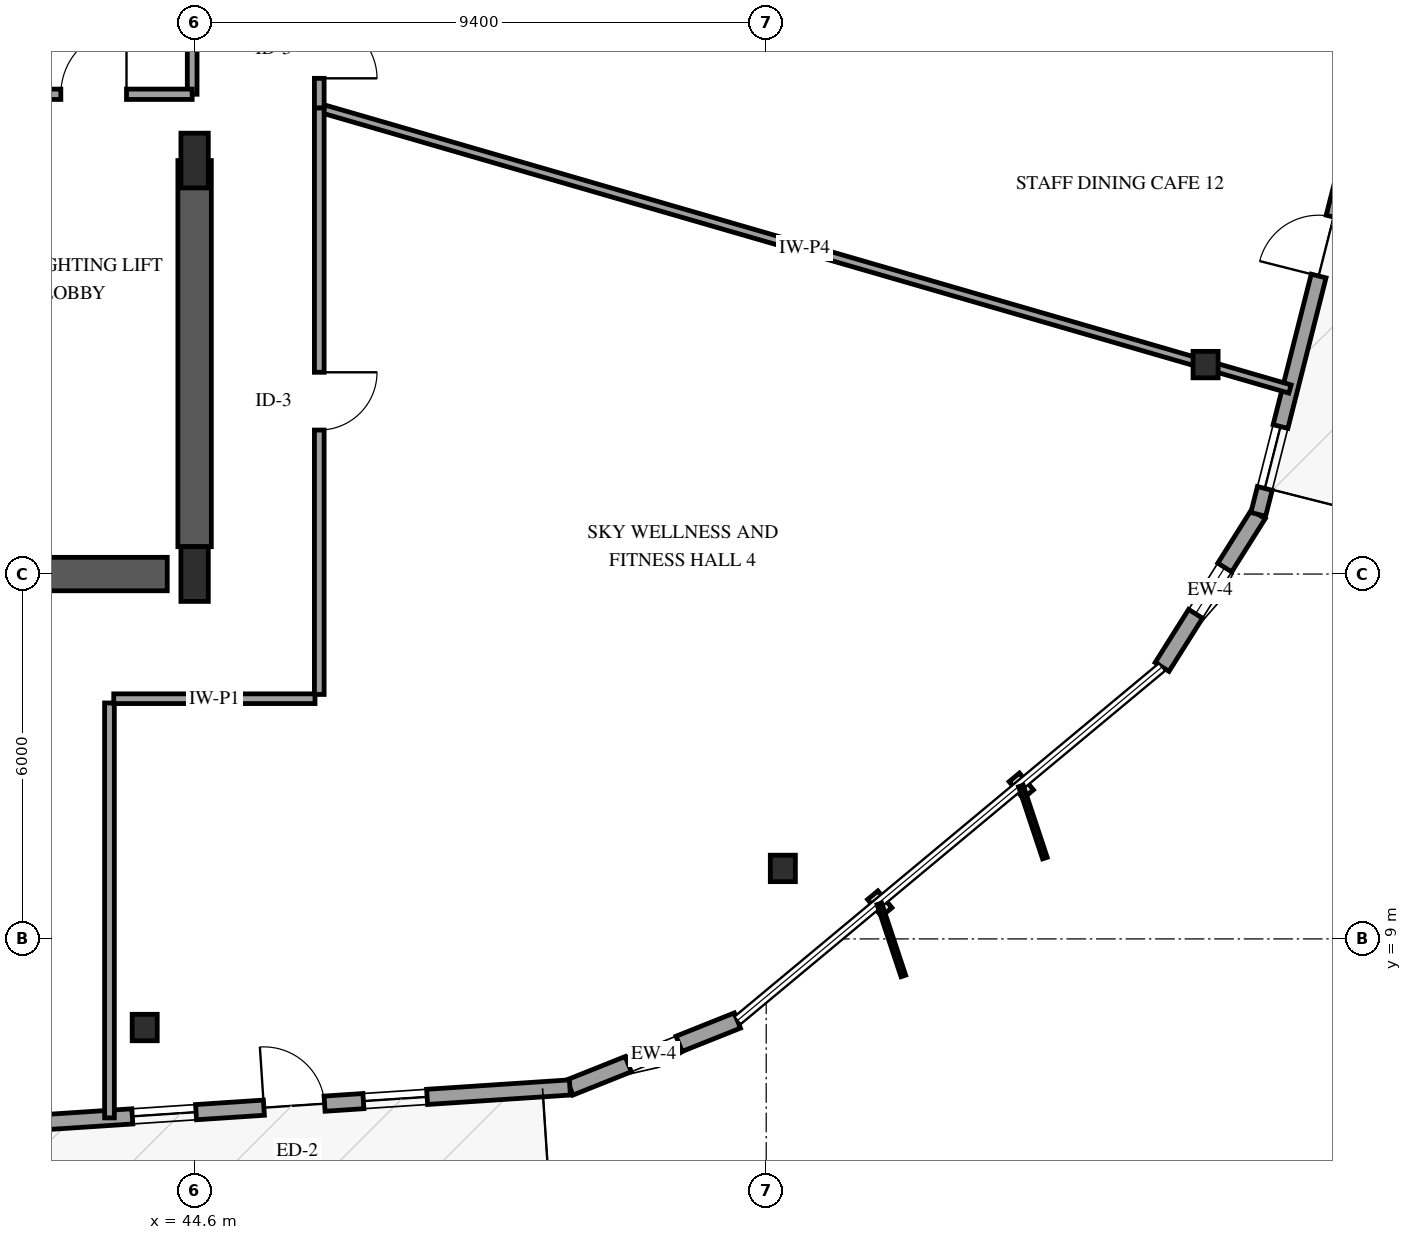
"""IFC4 building model, lengths in metres.
Left out: names, types, materials, properties, quantities, classifications, styles, units other than length and angle.
Written with IfcOpenShell. Run it as: python <this file> out.ifc"""

import sys

from ifc_helpers import new_model, si_unit, direction, frame, frame_2d, origin, origin_2d, place, context, subcontext, project, spatial, rectangle, i_section, extrude, element, fill, save


model = new_model("IFC4")
c1 = context("Model", 3, precision=1e-05, world=origin(), true_north=direction((0.0, 1.0)))
c2 = subcontext(c1, "Body", "Model", "MODEL_VIEW")
j1 = project(units=[si_unit("LENGTHUNIT", "METRE"), si_unit("PLANEANGLEUNIT", "RADIAN")], contexts=[c1])
p1 = place(None, origin())
s1 = spatial("IfcSite", under=j1, at=p1, CompositionType="ELEMENT")
p2 = place(p1, origin())
s2 = spatial("IfcBuilding", under=s1, at=p2, CompositionType="ELEMENT")
p3 = place(p2, frame((0.0, 0.0, 178.6)))
s3 = spatial("IfcBuildingStorey", under=s2, at=p3, CompositionType="ELEMENT", Elevation=178.6)
p4 = place(p3, frame((41.3, 15.0, 0.0), z_axis=(0.0, 0.0, 1.0), x_axis=(1.0, 0.0, 0.0)))
e1 = element("IfcWall", 1, at=p4, inside=s3, PredefinedType="SHEAR", context=c2, shape_type="SweptSolid", body=[
    extrude(rectangle(XDim=2.85, YDim=0.55, at=frame_2d((1.425, 0.0))), origin(), (0.0, 0.0, 1.0), 3.6),
])
p5 = place(p3, frame((44.6, 15.45, 0.0), z_axis=(0.0, 0.0, 1.0), x_axis=(0.0, 1.0, 0.0)))
e2 = element("IfcWall", 2, at=p5, inside=s3, PredefinedType="SHEAR", context=c2, shape_type="SweptSolid", body=[
    extrude(rectangle(XDim=6.35, YDim=0.55, at=frame_2d((3.175, 0.0))), origin(), (0.0, 0.0, 1.0), 3.6),
])
for number, where, z_axis, x_axis in (
    (3, (44.6, 15.0, 0.0), (0.0, 0.0, 1.0), (1.0, 0.0, 0.0)),
    (4, (44.6, 21.8, 0.0), (0.0, 0.0, 1.0), (1.0, 0.0, 0.0)),
):
    element("IfcColumn", number, at=place(p3, frame(where, z_axis=z_axis, x_axis=x_axis)), inside=s3, PredefinedType="PILASTER", context=c2, shape_type="SweptSolid", body=[
        extrude(rectangle(XDim=0.45, YDim=0.9, at=origin_2d()), origin(), (0.0, 0.0, 1.0), 3.6),
    ])
for number, where, z_axis, x_axis in (
    (5, (43.779, 7.542, 0.0), (0.0, 0.0, 1.0), (1.0, 0.0, 0.0)),
    (6, (54.274, 10.159, 0.0), (0.0, 0.0, 1.0), (1.0, 0.0, 0.0)),
    (7, (61.226, 18.444, 0.0), (0.0, 0.0, 1.0), (1.0, 0.0, 0.0)),
):
    element("IfcColumn", number, at=place(p3, frame(where, z_axis=z_axis, x_axis=x_axis)), inside=s3, PredefinedType="COLUMN", context=c2, shape_type="SweptSolid", body=[
        extrude(i_section(OverallWidth=0.412, OverallDepth=0.435, WebThickness=0.036, FlangeThickness=0.057, FilletRadius=0.038, at=origin_2d()), origin(), (0.0, 0.0, 1.0), 3.6),
    ])
p6 = place(p3, frame((50.772, 6.557, 0.0), z_axis=(0.0, 0.0, 1.0), x_axis=(0.928595836805, 0.371092672884, 0.0)))
e8 = element("IfcWall", 8, at=p6, inside=s3, PredefinedType="SOLIDWALL", context=c2, shape_type="SweptSolid", body=[
    extrude(rectangle(XDim=2.967, YDim=0.27, at=frame_2d((1.483, 0.0))), origin(), (0.0, 0.0, 1.0), 2.679),
])
p7 = place(p6, frame((1.033, 0.0, 0.75)))
e9 = element("IfcOpeningElement", 9, at=p7, cuts=e8, PredefinedType="OPENING", context=c2, shape_type="SweptSolid", body=[
    extrude(rectangle(XDim=0.9, YDim=1.5, at=frame_2d((0.45, 0.75))), frame((0.0, 0.145, 0.0), z_axis=(0.0, -1.0, 0.0), x_axis=(1.0, 0.0, 0.0)), (0.0, 0.0, 1.0), 0.29),
])
p8 = place(p3, frame((41.705, 5.958, 0.0), z_axis=(0.0, 0.0, 1.0), x_axis=(0.997825981394, 0.06590380001, 0.0)))
e10 = element("IfcWall", 10, at=p8, inside=s3, PredefinedType="SOLIDWALL", context=c2, shape_type="SweptSolid", body=[
    extrude(rectangle(XDim=9.087, YDim=0.25, at=frame_2d((4.543, 0.0))), origin(), (0.0, 0.0, 1.0), 2.679),
])
p9 = place(p8, frame((4.043, 0.0, 0.0)))
e11 = element("IfcOpeningElement", 11, at=p9, cuts=e10, PredefinedType="OPENING", context=c2, shape_type="SweptSolid", body=[
    extrude(rectangle(XDim=1.0, YDim=2.15, at=frame_2d((0.5, 1.075))), frame((0.0, 0.135, 0.0), z_axis=(0.0, -1.0, 0.0), x_axis=(1.0, 0.0, 0.0)), (0.0, 0.0, 1.0), 0.27),
])
p10 = place(p8, frame((1.875, 0.0, 0.72)))
e12 = element("IfcOpeningElement", 12, at=p10, cuts=e10, PredefinedType="OPENING", context=c2, shape_type="SweptSolid", body=[
    extrude(rectangle(XDim=1.05, YDim=1.55, at=frame_2d((0.525, 0.775))), frame((0.0, 0.135, 0.0), z_axis=(0.0, -1.0, 0.0), x_axis=(1.0, 0.0, 0.0)), (0.0, 0.0, 1.0), 0.27),
])
p11 = place(p8, frame((5.684, 0.0, 0.72)))
e13 = element("IfcOpeningElement", 13, at=p11, cuts=e10, PredefinedType="OPENING", context=c2, shape_type="SweptSolid", body=[
    extrude(rectangle(XDim=1.05, YDim=1.55, at=frame_2d((0.525, 0.775))), frame((0.0, 0.135, 0.0), z_axis=(0.0, -1.0, 0.0), x_axis=(1.0, 0.0, 0.0)), (0.0, 0.0, 1.0), 0.27),
])
p12 = place(p3, frame((60.51, 13.472, 0.0), z_axis=(0.0, 0.0, 1.0), x_axis=(0.533190820805, 0.845995005074, 0.0)))
e14 = element("IfcWall", 14, at=p12, inside=s3, PredefinedType="SOLIDWALL", context=c2, shape_type="SweptSolid", body=[
    extrude(rectangle(XDim=2.967, YDim=0.27, at=frame_2d((1.483, 0.0))), origin(), (0.0, 0.0, 1.0), 2.679),
])
p13 = place(p12, frame((1.033, 0.0, 0.75)))
e15 = element("IfcOpeningElement", 15, at=p13, cuts=e14, PredefinedType="OPENING", context=c2, shape_type="SweptSolid", body=[
    extrude(rectangle(XDim=0.9, YDim=1.5, at=frame_2d((0.45, 0.75))), frame((0.0, 0.145, 0.0), z_axis=(0.0, -1.0, 0.0), x_axis=(1.0, 0.0, 0.0)), (0.0, 0.0, 1.0), 0.29),
])
p14 = place(p3, frame((62.092, 15.982, 0.0), z_axis=(0.0, 0.0, 1.0), x_axis=(0.245644624453, 0.969359952999, 0.0)))
e16 = element("IfcWall", 16, at=p14, inside=s3, PredefinedType="SOLIDWALL", context=c2, shape_type="SweptSolid", body=[
    extrude(rectangle(XDim=9.087, YDim=0.25, at=frame_2d((4.543, 0.0))), origin(), (0.0, 0.0, 1.0), 2.679),
])
p15 = place(p14, frame((4.043, 0.0, 0.0)))
e17 = element("IfcOpeningElement", 17, at=p15, cuts=e16, PredefinedType="OPENING", context=c2, shape_type="SweptSolid", body=[
    extrude(rectangle(XDim=1.0, YDim=2.15, at=frame_2d((0.5, 1.075))), frame((0.0, 0.135, 0.0), z_axis=(0.0, -1.0, 0.0), x_axis=(1.0, 0.0, 0.0)), (0.0, 0.0, 1.0), 0.27),
])
p16 = place(p14, frame((0.44, 0.0, 0.72)))
e18 = element("IfcOpeningElement", 18, at=p16, cuts=e16, PredefinedType="OPENING", context=c2, shape_type="SweptSolid", body=[
    extrude(rectangle(XDim=1.05, YDim=1.55, at=frame_2d((0.525, 0.775))), frame((0.0, 0.135, 0.0), z_axis=(0.0, -1.0, 0.0), x_axis=(1.0, 0.0, 0.0)), (0.0, 0.0, 1.0), 0.27),
])
p17 = place(p14, frame((5.684, 0.0, 0.72)))
e19 = element("IfcOpeningElement", 19, at=p17, cuts=e16, PredefinedType="OPENING", context=c2, shape_type="SweptSolid", body=[
    extrude(rectangle(XDim=1.05, YDim=1.55, at=frame_2d((0.525, 0.775))), frame((0.0, 0.135, 0.0), z_axis=(0.0, -1.0, 0.0), x_axis=(1.0, 0.0, 0.0)), (0.0, 0.0, 1.0), 0.27),
])
p18 = place(p3, frame((46.65, 22.667, 0.0), z_axis=(0.0, 0.0, 1.0), x_axis=(0.960518719395, -0.278215365663, 0.0)))
e20 = element("IfcWall", 20, at=p18, inside=s3, PredefinedType="PARTITIONING", context=c2, shape_type="SweptSolid", body=[
    extrude(rectangle(XDim=16.62, YDim=0.14, at=frame_2d((8.31, 0.0))), origin(), (0.0, 0.0, 1.0), 2.674),
])
p19 = place(p3, frame((46.65, 22.667, 0.0), z_axis=(0.0, 0.0, 1.0), x_axis=(0.0, -1.0, 0.0)))
e21 = element("IfcWall", 21, at=p19, inside=s3, PredefinedType="PARTITIONING", context=c2, shape_type="SweptSolid", body=[
    extrude(rectangle(XDim=9.647, YDim=0.16, at=frame_2d((4.823, 0.0))), origin(), (0.0, 0.0, 1.0), 3.3),
])
p20 = place(p19, frame((4.349, 0.0, 0.0)))
e22 = element("IfcOpeningElement", 22, at=p20, cuts=e21, PredefinedType="OPENING", context=c2, shape_type="SweptSolid", body=[
    extrude(rectangle(XDim=0.95, YDim=2.15, at=frame_2d((0.475, 1.075))), frame((0.0, 0.09, 0.0), z_axis=(0.0, -1.0, 0.0), x_axis=(1.0, 0.0, 0.0)), (0.0, 0.0, 1.0), 0.18),
])
p21 = place(p3, frame((44.56, 29.8, 0.0), z_axis=(0.0, 0.0, 1.0), x_axis=(0.0, -1.0, 0.0)))
e23 = element("IfcWall", 23, at=p21, inside=s3, PredefinedType="PARTITIONING", context=c2, shape_type="SweptSolid", body=[
    extrude(rectangle(XDim=6.91, YDim=0.16, at=frame_2d((3.455, 0.0))), origin(), (0.0, 0.0, 1.0), 2.34),
])
p22 = place(p21, frame((2.915, 0.0, 0.0)))
e24 = element("IfcOpeningElement", 24, at=p22, cuts=e23, PredefinedType="OPENING", context=c2, shape_type="SweptSolid", body=[
    extrude(rectangle(XDim=1.08, YDim=2.15, at=frame_2d((0.54, 1.075))), frame((0.0, 0.09, 0.0), z_axis=(0.0, -1.0, 0.0), x_axis=(1.0, 0.0, 0.0)), (0.0, 0.0, 1.0), 0.18),
])
p23 = place(p3, frame((43.2, 12.88, 0.0), z_axis=(0.0, 0.0, 1.0), x_axis=(0.0, -1.0, 0.0)))
e25 = element("IfcWall", 25, at=p23, inside=s3, PredefinedType="PARTITIONING", context=c2, shape_type="SweptSolid", body=[
    extrude(rectangle(XDim=6.823, YDim=0.16, at=frame_2d((3.412, 0.0))), origin(), (0.0, 0.0, 1.0), 2.595),
])
p24 = place(p3, frame((46.58, 12.95, 0.0), z_axis=(0.0, 0.0, 1.0), x_axis=(-1.0, 0.0, 0.0)))
e26 = element("IfcWall", 26, at=p24, inside=s3, PredefinedType="PARTITIONING", context=c2, shape_type="SweptSolid", body=[
    extrude(rectangle(XDim=3.31, YDim=0.16, at=frame_2d((1.655, 0.0))), origin(), (0.0, 0.0, 1.0), 3.3),
])
p25 = place(p3, frame((41.32, 22.89, 0.0), z_axis=(0.0, 0.0, 1.0), x_axis=(1.0, 0.0, 0.0)))
e27 = element("IfcWall", 27, at=p25, inside=s3, PredefinedType="PARTITIONING", context=c2, shape_type="SweptSolid", body=[
    extrude(rectangle(XDim=3.24, YDim=0.17, at=frame_2d((1.62, 0.0))), origin(), (0.0, 0.0, 1.0), 3.3),
])
p26 = place(p25, frame((1.08, 0.0, 0.0)))
e28 = element("IfcOpeningElement", 28, at=p26, cuts=e27, PredefinedType="OPENING", context=c2, shape_type="SweptSolid", body=[
    extrude(rectangle(XDim=1.08, YDim=2.15, at=frame_2d((0.54, 1.075))), frame((0.0, 0.095, 0.0), z_axis=(0.0, -1.0, 0.0), x_axis=(1.0, 0.0, 0.0)), (0.0, 0.0, 1.0), 0.19),
])
p27 = place(p3, frame((46.65, 24.586, 0.0), z_axis=(0.0, 0.0, 1.0), x_axis=(0.0, -1.0, 0.0)))
e29 = element("IfcWall", 29, at=p27, inside=s3, PredefinedType="PARTITIONING", context=c2, shape_type="SweptSolid", body=[
    extrude(rectangle(XDim=1.919, YDim=0.16, at=frame_2d((0.959, 0.0))), origin(), (0.0, 0.0, 1.0), 3.3),
])
p28 = place(p27, frame((0.484, 0.0, 0.0)))
e30 = element("IfcOpeningElement", 30, at=p28, cuts=e29, PredefinedType="OPENING", context=c2, shape_type="SweptSolid", body=[
    extrude(rectangle(XDim=0.95, YDim=2.15, at=frame_2d((0.475, 1.075))), frame((0.0, 0.09, 0.0), z_axis=(0.0, -1.0, 0.0), x_axis=(1.0, 0.0, 0.0)), (0.0, 0.0, 1.0), 0.18),
])
p29 = place(p7, origin())
e31 = element("IfcWindow", 31, at=p29, inside=s3, PartitioningType="SINGLE_PANEL", PredefinedType="WINDOW", context=c2, shape_type="SweptSolid", body=[
    extrude(rectangle(XDim=0.9, YDim=1.5, at=frame_2d((0.45, 0.75))), frame((0.0, 0.03, 0.0), z_axis=(0.0, -1.0, 0.0), x_axis=(1.0, 0.0, 0.0)), (0.0, 0.0, 1.0), 0.06),
])
fill(e9, e31)
p30 = place(p9, origin())
e32 = element("IfcDoor", 32, at=p30, inside=s3, OperationType="SINGLE_SWING_LEFT", PredefinedType="DOOR", context=c2, shape_type="SweptSolid", body=[
    extrude(rectangle(XDim=1.0, YDim=2.15, at=frame_2d((0.5, 1.075))), frame((0.0, 0.025, 0.0), z_axis=(0.0, -1.0, 0.0), x_axis=(1.0, 0.0, 0.0)), (0.0, 0.0, 1.0), 0.05),
])
fill(e11, e32)
p31 = place(p10, origin())
e33 = element("IfcWindow", 33, at=p31, inside=s3, PartitioningType="SINGLE_PANEL", PredefinedType="WINDOW", context=c2, shape_type="SweptSolid", body=[
    extrude(rectangle(XDim=1.05, YDim=1.55, at=frame_2d((0.525, 0.775))), frame((0.0, 0.03, 0.0), z_axis=(0.0, -1.0, 0.0), x_axis=(1.0, 0.0, 0.0)), (0.0, 0.0, 1.0), 0.06),
])
fill(e12, e33)
p32 = place(p11, origin())
e34 = element("IfcWindow", 34, at=p32, inside=s3, PartitioningType="SINGLE_PANEL", PredefinedType="WINDOW", context=c2, shape_type="SweptSolid", body=[
    extrude(rectangle(XDim=1.05, YDim=1.55, at=frame_2d((0.525, 0.775))), frame((0.0, 0.03, 0.0), z_axis=(0.0, -1.0, 0.0), x_axis=(1.0, 0.0, 0.0)), (0.0, 0.0, 1.0), 0.06),
])
fill(e13, e34)
p33 = place(p13, origin())
e35 = element("IfcWindow", 35, at=p33, inside=s3, PartitioningType="SINGLE_PANEL", PredefinedType="WINDOW", context=c2, shape_type="SweptSolid", body=[
    extrude(rectangle(XDim=0.9, YDim=1.5, at=frame_2d((0.45, 0.75))), frame((0.0, 0.03, 0.0), z_axis=(0.0, -1.0, 0.0), x_axis=(1.0, 0.0, 0.0)), (0.0, 0.0, 1.0), 0.06),
])
fill(e15, e35)
p34 = place(p15, origin())
e36 = element("IfcDoor", 36, at=p34, inside=s3, OperationType="SINGLE_SWING_LEFT", PredefinedType="DOOR", context=c2, shape_type="SweptSolid", body=[
    extrude(rectangle(XDim=1.0, YDim=2.15, at=frame_2d((0.5, 1.075))), frame((0.0, 0.025, 0.0), z_axis=(0.0, -1.0, 0.0), x_axis=(1.0, 0.0, 0.0)), (0.0, 0.0, 1.0), 0.05),
])
fill(e17, e36)
p35 = place(p16, origin())
e37 = element("IfcWindow", 37, at=p35, inside=s3, PartitioningType="SINGLE_PANEL", PredefinedType="WINDOW", context=c2, shape_type="SweptSolid", body=[
    extrude(rectangle(XDim=1.05, YDim=1.55, at=frame_2d((0.525, 0.775))), frame((0.0, 0.03, 0.0), z_axis=(0.0, -1.0, 0.0), x_axis=(1.0, 0.0, 0.0)), (0.0, 0.0, 1.0), 0.06),
])
fill(e18, e37)
p36 = place(p20, origin())
e38 = element("IfcDoor", 38, at=p36, inside=s3, OperationType="SINGLE_SWING_LEFT", PredefinedType="DOOR", context=c2, shape_type="SweptSolid", body=[
    extrude(rectangle(XDim=0.95, YDim=2.15, at=frame_2d((0.475, 1.075))), frame((0.0, 0.025, 0.0), z_axis=(0.0, -1.0, 0.0), x_axis=(1.0, 0.0, 0.0)), (0.0, 0.0, 1.0), 0.05),
])
fill(e22, e38)
p37 = place(p26, origin())
e39 = element("IfcDoor", 39, at=p37, inside=s3, OperationType="SINGLE_SWING_RIGHT", PredefinedType="DOOR", context=c2, shape_type="SweptSolid", body=[
    extrude(rectangle(XDim=1.08, YDim=2.15, at=frame_2d((0.54, 1.075))), frame((0.0, 0.025, 0.0), z_axis=(0.0, -1.0, 0.0), x_axis=(1.0, 0.0, 0.0)), (0.0, 0.0, 1.0), 0.05),
])
fill(e28, e39)
p38 = place(p28, origin())
e40 = element("IfcDoor", 40, at=p38, inside=s3, OperationType="SINGLE_SWING_RIGHT", PredefinedType="DOOR", context=c2, shape_type="SweptSolid", body=[
    extrude(rectangle(XDim=0.95, YDim=2.15, at=frame_2d((0.475, 1.075))), frame((0.0, 0.025, 0.0), z_axis=(0.0, -1.0, 0.0), x_axis=(1.0, 0.0, 0.0)), (0.0, 0.0, 1.0), 0.05),
])
fill(e30, e40)
save(model, sys.argv[1])
